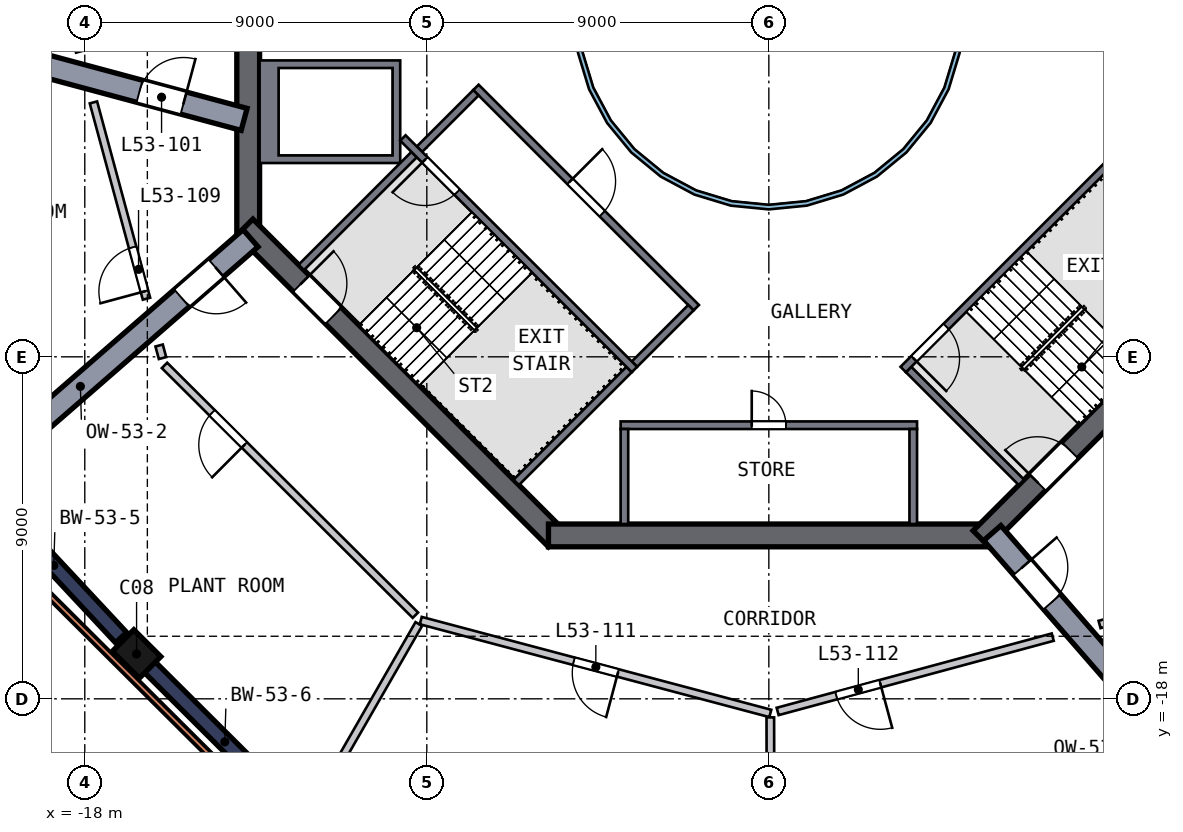
"""IFC4 building model, lengths in metres.
Left out: names, types, materials, properties, quantities, classifications, styles, units other than length and angle.
Written with IfcOpenShell. Run it as: python <this file> out.ifc"""

import sys

from ifc_helpers import new_model, si_unit, direction, frame, frame_2d, origin, origin_2d, place, context, subcontext, project, spatial, polyline, rectangle, outline, extrude, element, fill, save


model = new_model("IFC4")
c1 = context("Model", 3, precision=1e-05, world=origin(), true_north=direction((0.0, 1.0)))
c2 = subcontext(c1, "Body", "Model", "MODEL_VIEW")
j1 = project(units=[si_unit("LENGTHUNIT", "METRE"), si_unit("PLANEANGLEUNIT", "RADIAN")], contexts=[c1])
p1 = place(None, origin())
s1 = spatial("IfcSite", under=j1, at=p1, CompositionType="ELEMENT")
p2 = place(p1, origin())
s2 = spatial("IfcBuilding", under=s1, at=p2, CompositionType="ELEMENT")
p3 = place(p2, frame((0.0, 0.0, 216.0)))
s3 = spatial("IfcBuildingStorey", under=s2, at=p3, CompositionType="ELEMENT", Elevation=216.0)
p4 = place(p3, frame((-16.694, -16.764, 0.0), z_axis=(0.047097852, -0.046123414, 0.997824846), x_axis=(0.707006185, -0.704128528, -0.065918668)))
e1 = element("IfcColumn", 1, at=p4, inside=s3, PredefinedType="COLUMN", context=c2, shape_type="SweptSolid", body=[
    extrude(rectangle(XDim=1.0, YDim=0.8, at=origin_2d()), origin(), (0.0, 0.0, 1.0), 4.51),
])
p5 = place(p3, frame((-13.7, 5.799, 0.0), z_axis=(0.0, 0.0, 1.0), x_axis=(0.0, -1.0, 0.0)))
e2 = element("IfcWall", 2, at=p5, inside=s3, PredefinedType="SHEAR", context=c2, shape_type="SweptSolid", body=[
    extrude(rectangle(XDim=11.598, YDim=0.6, at=frame_2d((5.799, 0.0))), origin(), (0.0, 0.0, 1.0), 6.0),
])
p6 = place(p5, frame((4.899, 0.0, 0.0)))
e3 = element("IfcOpeningElement", 3, at=p6, cuts=e2, PredefinedType="OPENING", context=c2, shape_type="SweptSolid", body=[
    extrude(rectangle(XDim=1.8, YDim=2.1, at=frame_2d((0.9, 1.05))), frame((0.0, 0.31, 0.0), z_axis=(0.0, -1.0, 0.0), x_axis=(1.0, 0.0, 0.0)), (0.0, 0.0, 1.0), 0.62),
])
p7 = place(p3, frame((-13.788, -5.587, 0.0), z_axis=(0.0, 0.0, 1.0), x_axis=(0.707106781, -0.707106781, 0.0)))
e4 = element("IfcWall", 4, at=p7, inside=s3, PredefinedType="SHEAR", context=c2, shape_type="SweptSolid", body=[
    extrude(rectangle(XDim=11.598, YDim=0.6, at=frame_2d((5.799, 0.0))), origin(), (0.0, 0.0, 1.0), 6.0),
])
p8 = place(p7, frame((2.099, 0.0, 0.0)))
e5 = element("IfcOpeningElement", 5, at=p8, cuts=e4, PredefinedType="OPENING", context=c2, shape_type="SweptSolid", body=[
    extrude(rectangle(XDim=1.2, YDim=2.1, at=frame_2d((0.6, 1.05))), frame((0.0, 0.31, 0.0), z_axis=(0.0, -1.0, 0.0), x_axis=(1.0, 0.0, 0.0)), (0.0, 0.0, 1.0), 0.62),
])
p9 = place(p3, frame((-5.799, -13.7, 0.0), z_axis=(0.0, 0.0, 1.0), x_axis=(1.0, 0.0, 0.0)))
e6 = element("IfcWall", 6, at=p9, inside=s3, PredefinedType="SHEAR", context=c2, shape_type="SweptSolid", body=[
    extrude(rectangle(XDim=11.598, YDim=0.6, at=frame_2d((5.799, 0.0))), origin(), (0.0, 0.0, 1.0), 6.0),
])
p10 = place(p3, frame((5.587, -13.788, 0.0), z_axis=(0.0, 0.0, 1.0), x_axis=(0.707106781, 0.707106781, 0.0)))
e7 = element("IfcWall", 7, at=p10, inside=s3, PredefinedType="SHEAR", context=c2, shape_type="SweptSolid", body=[
    extrude(rectangle(XDim=11.598, YDim=0.6, at=frame_2d((5.799, 0.0))), origin(), (0.0, 0.0, 1.0), 6.0),
])
p11 = place(p10, frame((2.099, 0.0, 0.0)))
e8 = element("IfcOpeningElement", 8, at=p11, cuts=e7, PredefinedType="OPENING", context=c2, shape_type="SweptSolid", body=[
    extrude(rectangle(XDim=1.2, YDim=2.1, at=frame_2d((0.6, 1.05))), frame((0.0, 0.31, 0.0), z_axis=(0.0, -1.0, 0.0), x_axis=(1.0, 0.0, 0.0)), (0.0, 0.0, 1.0), 0.62),
])
p12 = place(p3, frame((-20.586, -12.593, 0.0), z_axis=(0.0, 0.0, 1.0), x_axis=(0.682274678, -0.731095933, 0.0)))
e9 = element("IfcWall", 9, at=p12, inside=s3, PredefinedType="SHEAR", context=c2, shape_type="SweptSolid", body=[
    extrude(rectangle(XDim=5.191, YDim=0.4, at=frame_2d((2.595, 0.0))), origin(), (0.0, 0.0, 1.0), 4.5),
])
p13 = place(p3, frame((-16.34, -17.117, 0.0), z_axis=(0.0, 0.0, 1.0), x_axis=(0.708579493, -0.705630996, 0.0)))
e10 = element("IfcWall", 10, at=p13, inside=s3, PredefinedType="SHEAR", context=c2, shape_type="SweptSolid", body=[
    extrude(rectangle(XDim=5.713, YDim=0.4, at=frame_2d((2.857, 0.0))), origin(), (0.0, 0.0, 1.0), 4.5),
])
p14 = place(p3, frame((-13.807, -2.752, 0.0), z_axis=(0.0, 0.0, 1.0), x_axis=(-0.965695007, 0.259678944, 0.0)))
e11 = element("IfcWall", 11, at=p14, inside=s3, PredefinedType="SHEAR", context=c2, shape_type="SweptSolid", body=[
    extrude(rectangle(XDim=10.405, YDim=0.6, at=frame_2d((5.202, 0.0))), origin(), (0.0, 0.0, 1.0), 4.5),
])
p15 = place(p14, frame((1.65, 0.0, 0.0)))
e12 = element("IfcOpeningElement", 12, at=p15, cuts=e11, PredefinedType="OPENING", context=c2, shape_type="SweptSolid", body=[
    extrude(rectangle(XDim=1.2, YDim=2.1, at=frame_2d((0.6, 1.05))), frame((0.0, 0.31, 0.0), z_axis=(0.0, -1.0, 0.0), x_axis=(1.0, 0.0, 0.0)), (0.0, 0.0, 1.0), 0.62),
])
p16 = place(p3, frame((-13.638, -5.879, 0.0), z_axis=(0.0, 0.0, 1.0), x_axis=(-0.754178716, -0.656669219, 0.0)))
e13 = element("IfcWall", 13, at=p16, inside=s3, PredefinedType="SHEAR", context=c2, shape_type="SweptSolid", body=[
    extrude(rectangle(XDim=9.276, YDim=0.6, at=frame_2d((4.638, 0.0))), origin(), (0.0, 0.0, 1.0), 4.5),
])
p17 = place(p16, frame((1.2, 0.0, 0.0)))
e14 = element("IfcOpeningElement", 14, at=p17, cuts=e13, PredefinedType="OPENING", context=c2, shape_type="SweptSolid", body=[
    extrude(rectangle(XDim=1.2, YDim=2.1, at=frame_2d((0.6, 1.05))), frame((0.0, 0.31, 0.0), z_axis=(0.0, -1.0, 0.0), x_axis=(1.0, 0.0, 0.0)), (0.0, 0.0, 1.0), 0.62),
])
p18 = place(p3, frame((5.879, -13.638, 0.0), z_axis=(0.0, 0.0, 1.0), x_axis=(0.656669219, -0.754178716, 0.0)))
e15 = element("IfcWall", 15, at=p18, inside=s3, PredefinedType="SHEAR", context=c2, shape_type="SweptSolid", body=[
    extrude(rectangle(XDim=9.276, YDim=0.6, at=frame_2d((4.638, 0.0))), origin(), (0.0, 0.0, 1.0), 4.5),
])
p19 = place(p18, frame((1.2, 0.0, 0.0)))
e16 = element("IfcOpeningElement", 16, at=p19, cuts=e15, PredefinedType="OPENING", context=c2, shape_type="SweptSolid", body=[
    extrude(rectangle(XDim=1.2, YDim=2.1, at=frame_2d((0.6, 1.05))), frame((0.0, 0.31, 0.0), z_axis=(0.0, -1.0, 0.0), x_axis=(1.0, 0.0, 0.0)), (0.0, 0.0, 1.0), 0.62),
])
p20 = place(p3, frame((-21.67, -12.549, 0.0), z_axis=(0.0, 0.0, 1.0), x_axis=(0.708589659, -0.705620787, 0.0)))
e17 = element("IfcWall", 17, at=p20, inside=s3, PredefinedType="SOLIDWALL", context=c2, shape_type="SweptSolid", body=[
    extrude(rectangle(XDim=13.075, YDim=0.15, at=frame_2d((6.538, 0.0))), origin(), (0.0, 0.0, 1.0), 4.5),
])
p21 = place(p3, origin())
e18 = element("IfcWall", 18, at=p21, inside=s3, PredefinedType="SOLIDWALL", context=c2, shape_type="SweptSolid", body=[
    extrude(outline(polyline([(-9.7, -3.9), (-13.4, -3.9), (-13.4, -1.2), (-9.7, -1.2), (-9.7, -3.9)]), holes=[polyline([(-12.9, -1.4), (-12.9, -3.7), (-9.9, -3.7), (-9.9, -1.4), (-12.9, -1.4)])]), origin(), (0.0, 0.0, 1.0), 5.55),
])
p22 = place(p3, frame((-3.9, -10.8, 0.0), z_axis=(0.0, 0.0, 1.0), x_axis=(1.0, 0.0, 0.0)))
e19 = element("IfcWall", 19, at=p22, inside=s3, PredefinedType="SOLIDWALL", context=c2, shape_type="SweptSolid", body=[
    extrude(rectangle(XDim=7.8, YDim=0.2, at=frame_2d((3.9, 0.0))), origin(), (0.0, 0.0, 1.0), 5.55),
])
p23 = place(p22, frame((3.45, 0.0, 0.0)))
e20 = element("IfcOpeningElement", 20, at=p23, cuts=e19, PredefinedType="OPENING", context=c2, shape_type="SweptSolid", body=[
    extrude(rectangle(XDim=0.9, YDim=2.1, at=frame_2d((0.45, 1.05))), frame((0.0, 0.11, 0.0), z_axis=(0.0, -1.0, 0.0), x_axis=(1.0, 0.0, 0.0)), (0.0, 0.0, 1.0), 0.22),
])
for number, where, z_axis, x_axis in (
    (21, (-3.8, -10.9, 0.0), (0.0, 0.0, 1.0), (0.0, -1.0, 0.0)),
    (22, (3.8, -10.9, 0.0), (0.0, 0.0, 1.0), (0.0, -1.0, 0.0)),
):
    element("IfcWall", number, at=place(p3, frame(where, z_axis=z_axis, x_axis=x_axis)), inside=s3, PredefinedType="SOLIDWALL", context=c2, shape_type="SweptSolid", body=[
        extrude(rectangle(XDim=2.5, YDim=0.2, at=frame_2d((1.25, 0.0))), origin(), (0.0, 0.0, 1.0), 5.55),
    ])
p24 = place(p3, frame((-3.535, -9.334, 0.0), z_axis=(0.0, 0.0, 1.0), x_axis=(-0.707120946, 0.707092617, 0.0)))
e23 = element("IfcWall", 23, at=p24, inside=s3, PredefinedType="SOLIDWALL", context=c2, shape_type="SweptSolid", body=[
    extrude(rectangle(XDim=8.618, YDim=0.2, at=frame_2d((4.309, 0.0))), origin(), (0.0, 0.0, 1.0), 5.55),
])
p25 = place(p24, frame((6.6, 0.0, 0.0)))
e24 = element("IfcOpeningElement", 24, at=p25, cuts=e23, PredefinedType="OPENING", context=c2, shape_type="SweptSolid", body=[
    extrude(rectangle(XDim=1.2, YDim=2.1, at=frame_2d((0.6, 1.05))), frame((0.0, 0.11, 0.0), z_axis=(0.0, -1.0, 0.0), x_axis=(1.0, 0.0, 0.0)), (0.0, 0.0, 1.0), 0.22),
])
for number, where, z_axis, x_axis in (
    (25, (-9.334, -3.677, 0.0), (0.0, 0.0, 1.0), (-0.707, -0.707, 0.0)),
    (26, (-3.677, -9.334, 0.0), (0.0, 0.0, 1.0), (-0.707, -0.707, 0.0)),
):
    element("IfcWall", number, at=place(p3, frame(where, z_axis=z_axis, x_axis=x_axis)), inside=s3, PredefinedType="SOLIDWALL", context=c2, shape_type="SweptSolid", body=[
        extrude(rectangle(XDim=4.2, YDim=0.2, at=frame_2d((2.1, 0.0))), origin(), (0.0, 0.0, 1.0), 5.55),
    ])
p26 = place(p3, frame((9.629, -3.24, 0.0), z_axis=(0.0, 0.0, 1.0), x_axis=(-0.707120946, -0.707092617, 0.0)))
e27 = element("IfcWall", 27, at=p26, inside=s3, PredefinedType="SOLIDWALL", context=c2, shape_type="SweptSolid", body=[
    extrude(rectangle(XDim=8.618, YDim=0.2, at=frame_2d((4.309, 0.0))), origin(), (0.0, 0.0, 1.0), 5.55),
])
p27 = place(p26, frame((7.018, 0.0, 0.0)))
e28 = element("IfcOpeningElement", 28, at=p27, cuts=e27, PredefinedType="OPENING", context=c2, shape_type="SweptSolid", body=[
    extrude(rectangle(XDim=1.2, YDim=2.1, at=frame_2d((0.6, 1.05))), frame((0.0, 0.11, 0.0), z_axis=(0.0, -1.0, 0.0), x_axis=(1.0, 0.0, 0.0)), (0.0, 0.0, 1.0), 0.22),
])
p28 = place(p3, frame((3.677, -9.334, 0.0), z_axis=(0.0, 0.0, 1.0), x_axis=(0.707077716, -0.707135845, 0.0)))
e29 = element("IfcWall", 29, at=p28, inside=s3, PredefinedType="SOLIDWALL", context=c2, shape_type="SweptSolid", body=[
    extrude(rectangle(XDim=4.2, YDim=0.2, at=frame_2d((2.1, 0.0))), origin(), (0.0, 0.0, 1.0), 5.55),
])
p29 = place(p3, frame((-7.708, -1.909, 0.0), z_axis=(0.0, 0.0, 1.0), x_axis=(0.707106781, -0.707106781, 0.0)))
e30 = element("IfcWall", 30, at=p29, inside=s3, PredefinedType="SOLIDWALL", context=c2, shape_type="SweptSolid", body=[
    extrude(rectangle(XDim=8.2, YDim=0.2, at=frame_2d((4.1, 0.0))), origin(), (0.0, 0.0, 1.0), 5.55),
])
p30 = place(p29, frame((3.5, 0.0, 0.0)))
e31 = element("IfcOpeningElement", 31, at=p30, cuts=e30, PredefinedType="OPENING", context=c2, shape_type="SweptSolid", body=[
    extrude(rectangle(XDim=1.2, YDim=2.1, at=frame_2d((0.6, 1.05))), frame((0.0, 0.11, 0.0), z_axis=(0.0, -1.0, 0.0), x_axis=(1.0, 0.0, 0.0)), (0.0, 0.0, 1.0), 0.22),
])
for number, where, z_axis, x_axis in (
    (32, (-7.708, -2.051, 0.0), (0.0, 0.0, 1.0), (-0.707, -0.707, 0.0)),
    (33, (-2.051, -7.708, 0.0), (0.0, 0.0, 1.0), (-0.707, -0.707, 0.0)),
):
    element("IfcWall", number, at=place(p3, frame(where, z_axis=z_axis, x_axis=x_axis)), inside=s3, PredefinedType="SOLIDWALL", context=c2, shape_type="SweptSolid", body=[
        extrude(rectangle(XDim=2.1, YDim=0.2, at=frame_2d((1.05, 0.0))), origin(), (0.0, 0.0, 1.0), 5.55),
    ])
p31 = place(p3, origin())
e34 = element("IfcWall", 34, at=p31, inside=s3, PredefinedType="SOLIDWALL", context=c2, shape_type="SweptSolid", body=[
    extrude(outline(polyline([(5.021, -0.999), (4.73, -1.959), (4.257, -2.844), (3.62, -3.62), (2.844, -4.257), (1.959, -4.73), (0.999, -5.021), (0.0, -5.12), (-0.999, -5.021), (-1.959, -4.73), (-2.844, -4.257), (-3.62, -3.62), (-4.257, -2.844), (-4.73, -1.959), (-5.021, -0.999), (-5.12, 0.0), (-5.021, 0.999), (-4.73, 1.959), (-4.257, 2.844), (-3.62, 3.62), (-2.844, 4.257), (-1.959, 4.73), (-0.999, 5.021), (0.0, 5.12), (0.999, 5.021), (1.959, 4.73), (2.844, 4.257), (3.62, 3.62), (4.257, 2.844), (4.73, 1.959), (5.021, 0.999), (5.12, 0.0), (5.021, -0.999)]), holes=[polyline([(4.904, 0.976), (4.619, 1.913), (4.157, 2.778), (3.535, 3.535), (2.778, 4.157), (1.913, 4.619), (0.976, 4.904), (0.0, 5.0), (-0.976, 4.904), (-1.913, 4.619), (-2.778, 4.157), (-3.535, 3.535), (-4.157, 2.778), (-4.619, 1.913), (-4.904, 0.976), (-5.0, 0.0), (-4.904, -0.976), (-4.619, -1.913), (-4.157, -2.778), (-3.535, -3.535), (-2.778, -4.157), (-1.913, -4.619), (-0.976, -4.904), (0.0, -5.0), (0.976, -4.904), (1.913, -4.619), (2.778, -4.157), (3.535, -3.535), (4.157, -2.778), (4.619, -1.913), (4.904, -0.976), (5.0, 0.0), (4.904, 0.976)])]), origin(), (0.0, 0.0, 1.0), 5.55),
])
p32 = place(p3, frame((-18.333, -0.232, 0.0), z_axis=(0.0, 0.0, 1.0), x_axis=(0.260764142, -0.965402539, 0.0)))
e35 = element("IfcWall", 35, at=p32, inside=s3, PredefinedType="SOLIDWALL", context=c2, shape_type="SweptSolid", body=[
    extrude(rectangle(XDim=0.764, YDim=0.2, at=frame_2d((0.382, 0.0))), origin(), (0.0, 0.0, 1.0), 4.5),
])
p33 = place(p3, frame((-16.377, -7.471, 0.0), z_axis=(0.0, 0.0, 1.0), x_axis=(-0.260807891, 0.965390721, 0.0)))
e36 = element("IfcWall", 36, at=p33, inside=s3, PredefinedType="SOLIDWALL", context=c2, shape_type="SweptSolid", body=[
    extrude(rectangle(XDim=5.351, YDim=0.2, at=frame_2d((2.675, 0.0))), origin(), (0.0, 0.0, 1.0), 4.5),
])
p34 = place(p33, frame((0.2, 0.0, 0.0)))
e37 = element("IfcOpeningElement", 37, at=p34, cuts=e36, PredefinedType="OPENING", context=c2, shape_type="SweptSolid", body=[
    extrude(rectangle(XDim=1.2, YDim=2.1, at=frame_2d((0.6, 1.05))), frame((0.0, 0.11, 0.0), z_axis=(0.0, -1.0, 0.0), x_axis=(1.0, 0.0, 0.0)), (0.0, 0.0, 1.0), 0.22),
])
p35 = place(p3, frame((-16.044, -8.703, 0.0), z_axis=(0.0, 0.0, 1.0), x_axis=(0.26063923, -0.96543627, 0.0)))
e38 = element("IfcWall", 38, at=p35, inside=s3, PredefinedType="SOLIDWALL", context=c2, shape_type="SweptSolid", body=[
    extrude(rectangle(XDim=0.342, YDim=0.2, at=frame_2d((0.171, 0.0))), origin(), (0.0, 0.0, 1.0), 4.5),
])
p36 = place(p3, frame((-9.301, -15.8, 0.0), z_axis=(0.0, 0.0, 1.0), x_axis=(-0.708572717, 0.7056378, 0.0)))
e39 = element("IfcWall", 39, at=p36, inside=s3, PredefinedType="SOLIDWALL", context=c2, shape_type="SweptSolid", body=[
    extrude(rectangle(XDim=9.317, YDim=0.2, at=frame_2d((4.658, 0.0))), origin(), (0.0, 0.0, 1.0), 4.5),
])
p37 = place(p36, frame((6.35, 0.0, 0.0)))
e40 = element("IfcOpeningElement", 40, at=p37, cuts=e39, PredefinedType="OPENING", context=c2, shape_type="SweptSolid", body=[
    extrude(rectangle(XDim=1.2, YDim=2.1, at=frame_2d((0.6, 1.05))), frame((0.0, 0.11, 0.0), z_axis=(0.0, -1.0, 0.0), x_axis=(1.0, 0.0, 0.0)), (0.0, 0.0, 1.0), 0.22),
])
p38 = place(p3, frame((-9.211, -16.031, 0.0), z_axis=(0.0, 0.0, 1.0), x_axis=(-0.498162659, -0.867083598, 0.0)))
e41 = element("IfcWall", 41, at=p38, inside=s3, PredefinedType="SOLIDWALL", context=c2, shape_type="SweptSolid", body=[
    extrude(rectangle(XDim=5.726, YDim=0.2, at=frame_2d((2.863, 0.0))), origin(), (0.0, 0.0, 1.0), 4.5),
])
p39 = place(p3, frame((0.039, -18.385, 0.0), z_axis=(0.0, 0.0, 1.0), x_axis=(-0.966465332, 0.256797122, 0.0)))
e42 = element("IfcWall", 42, at=p39, inside=s3, PredefinedType="SOLIDWALL", context=c2, shape_type="SweptSolid", body=[
    extrude(rectangle(XDim=9.517, YDim=0.2, at=frame_2d((4.758, 0.0))), origin(), (0.0, 0.0, 1.0), 4.5),
])
p40 = place(p39, frame((4.15, 0.0, 0.0)))
e43 = element("IfcOpeningElement", 43, at=p40, cuts=e42, PredefinedType="OPENING", context=c2, shape_type="SweptSolid", body=[
    extrude(rectangle(XDim=1.2, YDim=2.1, at=frame_2d((0.6, 1.05))), frame((0.0, 0.11, 0.0), z_axis=(0.0, -1.0, 0.0), x_axis=(1.0, 0.0, 0.0)), (0.0, 0.0, 1.0), 0.22),
])
p41 = place(p3, frame((0.039, -18.488, 0.0), z_axis=(0.0, 0.0, 1.0), x_axis=(0.002057969, -0.999997882, 0.0)))
e44 = element("IfcWall", 44, at=p41, inside=s3, PredefinedType="SOLIDWALL", context=c2, shape_type="SweptSolid", body=[
    extrude(rectangle(XDim=5.576, YDim=0.2, at=frame_2d((2.788, 0.0))), origin(), (0.0, 0.0, 1.0), 4.5),
])
p42 = place(p3, frame((7.471, -16.377, 0.0), z_axis=(0.0, 0.0, 1.0), x_axis=(-0.965386218, -0.260824559, 0.0)))
e45 = element("IfcWall", 45, at=p42, inside=s3, PredefinedType="SOLIDWALL", context=c2, shape_type="SweptSolid", body=[
    extrude(rectangle(XDim=7.499, YDim=0.2, at=frame_2d((3.749, 0.0))), origin(), (0.0, 0.0, 1.0), 4.5),
])
p43 = place(p42, frame((4.7, 0.0, 0.0)))
e46 = element("IfcOpeningElement", 46, at=p43, cuts=e45, PredefinedType="OPENING", context=c2, shape_type="SweptSolid", body=[
    extrude(rectangle(XDim=1.2, YDim=2.1, at=frame_2d((0.6, 1.05))), frame((0.0, 0.11, 0.0), z_axis=(0.0, -1.0, 0.0), x_axis=(1.0, 0.0, 0.0)), (0.0, 0.0, 1.0), 0.22),
])
p44 = place(p3, frame((8.703, -16.044, 0.0), z_axis=(0.0, 0.0, 1.0), x_axis=(0.96543627, 0.26063923, 0.0)))
e47 = element("IfcWall", 47, at=p44, inside=s3, PredefinedType="SOLIDWALL", context=c2, shape_type="SweptSolid", body=[
    extrude(rectangle(XDim=0.342, YDim=0.2, at=frame_2d((0.171, 0.0))), origin(), (0.0, 0.0, 1.0), 4.5),
])
p45 = place(p23, origin())
e48 = element("IfcDoor", 48, at=p45, inside=s3, OperationType="SINGLE_SWING_LEFT", PredefinedType="DOOR", context=c2, shape_type="SweptSolid", body=[
    extrude(rectangle(XDim=0.9, YDim=2.1, at=frame_2d((0.45, 1.05))), frame((0.0, 0.025, 0.0), z_axis=(0.0, -1.0, 0.0), x_axis=(1.0, 0.0, 0.0)), (0.0, 0.0, 1.0), 0.05),
])
fill(e20, e48)
p46 = place(p25, origin())
e49 = element("IfcDoor", 49, at=p46, inside=s3, OperationType="SINGLE_SWING_RIGHT", PredefinedType="DOOR", context=c2, shape_type="SweptSolid", body=[
    extrude(rectangle(XDim=1.2, YDim=2.1, at=frame_2d((0.6, 1.05))), frame((0.0, 0.025, 0.0), z_axis=(0.0, -1.0, 0.0), x_axis=(1.0, 0.0, 0.0)), (0.0, 0.0, 1.0), 0.05),
])
fill(e24, e49)
p47 = place(p27, origin())
e50 = element("IfcDoor", 50, at=p47, inside=s3, OperationType="SINGLE_SWING_RIGHT", PredefinedType="DOOR", context=c2, shape_type="SweptSolid", body=[
    extrude(rectangle(XDim=1.2, YDim=2.1, at=frame_2d((0.6, 1.05))), frame((0.0, 0.025, 0.0), z_axis=(0.0, -1.0, 0.0), x_axis=(1.0, 0.0, 0.0)), (0.0, 0.0, 1.0), 0.05),
])
fill(e28, e50)
p48 = place(p8, origin())
e51 = element("IfcDoor", 51, at=p48, inside=s3, OperationType="SINGLE_SWING_LEFT", PredefinedType="DOOR", context=c2, shape_type="SweptSolid", body=[
    extrude(rectangle(XDim=1.2, YDim=2.1, at=frame_2d((0.6, 1.05))), frame((0.0, 0.025, 0.0), z_axis=(0.0, -1.0, 0.0), x_axis=(1.0, 0.0, 0.0)), (0.0, 0.0, 1.0), 0.05),
])
fill(e5, e51)
p49 = place(p11, origin())
e52 = element("IfcDoor", 52, at=p49, inside=s3, OperationType="SINGLE_SWING_LEFT", PredefinedType="DOOR", context=c2, shape_type="SweptSolid", body=[
    extrude(rectangle(XDim=1.2, YDim=2.1, at=frame_2d((0.6, 1.05))), frame((0.0, 0.025, 0.0), z_axis=(0.0, -1.0, 0.0), x_axis=(1.0, 0.0, 0.0)), (0.0, 0.0, 1.0), 0.05),
])
fill(e8, e52)
p50 = place(p30, origin())
e53 = element("IfcDoor", 53, at=p50, inside=s3, OperationType="SINGLE_SWING_LEFT", PredefinedType="DOOR", context=c2, shape_type="SweptSolid", body=[
    extrude(rectangle(XDim=1.2, YDim=2.1, at=frame_2d((0.6, 1.05))), frame((0.0, 0.025, 0.0), z_axis=(0.0, -1.0, 0.0), x_axis=(1.0, 0.0, 0.0)), (0.0, 0.0, 1.0), 0.05),
])
fill(e31, e53)
p51 = place(p15, origin())
e54 = element("IfcDoor", 54, at=p51, inside=s3, OperationType="SINGLE_SWING_LEFT", PredefinedType="DOOR", context=c2, shape_type="SweptSolid", body=[
    extrude(rectangle(XDim=1.2, YDim=2.1, at=frame_2d((0.6, 1.05))), frame((0.0, 0.025, 0.0), z_axis=(0.0, -1.0, 0.0), x_axis=(1.0, 0.0, 0.0)), (0.0, 0.0, 1.0), 0.05),
])
fill(e12, e54)
p52 = place(p17, origin())
e55 = element("IfcDoor", 55, at=p52, inside=s3, OperationType="SINGLE_SWING_LEFT", PredefinedType="DOOR", context=c2, shape_type="SweptSolid", body=[
    extrude(rectangle(XDim=1.2, YDim=2.1, at=frame_2d((0.6, 1.05))), frame((0.0, 0.025, 0.0), z_axis=(0.0, -1.0, 0.0), x_axis=(1.0, 0.0, 0.0)), (0.0, 0.0, 1.0), 0.05),
])
fill(e14, e55)
p53 = place(p19, origin())
e56 = element("IfcDoor", 56, at=p53, inside=s3, OperationType="SINGLE_SWING_LEFT", PredefinedType="DOOR", context=c2, shape_type="SweptSolid", body=[
    extrude(rectangle(XDim=1.2, YDim=2.1, at=frame_2d((0.6, 1.05))), frame((0.0, 0.025, 0.0), z_axis=(0.0, -1.0, 0.0), x_axis=(1.0, 0.0, 0.0)), (0.0, 0.0, 1.0), 0.05),
])
fill(e16, e56)
p54 = place(p34, origin())
e57 = element("IfcDoor", 57, at=p54, inside=s3, OperationType="SINGLE_SWING_LEFT", PredefinedType="DOOR", context=c2, shape_type="SweptSolid", body=[
    extrude(rectangle(XDim=1.2, YDim=2.1, at=frame_2d((0.6, 1.05))), frame((0.0, 0.025, 0.0), z_axis=(0.0, -1.0, 0.0), x_axis=(1.0, 0.0, 0.0)), (0.0, 0.0, 1.0), 0.05),
])
fill(e37, e57)
p55 = place(p37, origin())
e58 = element("IfcDoor", 58, at=p55, inside=s3, OperationType="SINGLE_SWING_LEFT", PredefinedType="DOOR", context=c2, shape_type="SweptSolid", body=[
    extrude(rectangle(XDim=1.2, YDim=2.1, at=frame_2d((0.6, 1.05))), frame((0.0, 0.025, 0.0), z_axis=(0.0, -1.0, 0.0), x_axis=(1.0, 0.0, 0.0)), (0.0, 0.0, 1.0), 0.05),
])
fill(e40, e58)
p56 = place(p40, origin())
e59 = element("IfcDoor", 59, at=p56, inside=s3, OperationType="SINGLE_SWING_LEFT", PredefinedType="DOOR", context=c2, shape_type="SweptSolid", body=[
    extrude(rectangle(XDim=1.2, YDim=2.1, at=frame_2d((0.6, 1.05))), frame((0.0, 0.025, 0.0), z_axis=(0.0, -1.0, 0.0), x_axis=(1.0, 0.0, 0.0)), (0.0, 0.0, 1.0), 0.05),
])
fill(e43, e59)
p57 = place(p43, origin())
e60 = element("IfcDoor", 60, at=p57, inside=s3, OperationType="SINGLE_SWING_LEFT", PredefinedType="DOOR", context=c2, shape_type="SweptSolid", body=[
    extrude(rectangle(XDim=1.2, YDim=2.1, at=frame_2d((0.6, 1.05))), frame((0.0, 0.025, 0.0), z_axis=(0.0, -1.0, 0.0), x_axis=(1.0, 0.0, 0.0)), (0.0, 0.0, 1.0), 0.05),
])
fill(e46, e60)
save(model, sys.argv[1])
